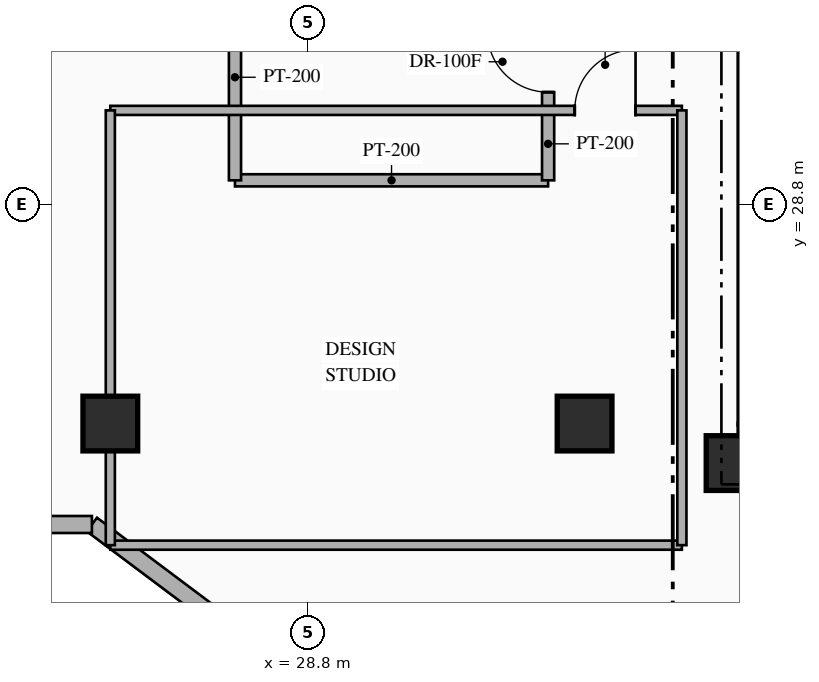
"""IFC4 building model, lengths in metres.
Left out: names, types, materials, properties, quantities, classifications, styles, units other than length and angle.
Written with IfcOpenShell. Run it as: python <this file> out.ifc"""

import sys

from ifc_helpers import new_model, si_unit, direction, frame, frame_2d, origin, origin_2d, place, context, subcontext, project, spatial, rectangle, hollow_rectangle, extrude, element, fill, save


model = new_model("IFC4")
c1 = context("Model", 3, precision=1e-05, world=origin(), true_north=direction((0.0, 1.0)))
c2 = subcontext(c1, "Body", "Model", "MODEL_VIEW")
j1 = project(units=[si_unit("LENGTHUNIT", "METRE"), si_unit("PLANEANGLEUNIT", "RADIAN")], contexts=[c1])
p1 = place(None, origin())
s1 = spatial("IfcSite", under=j1, at=p1, CompositionType="ELEMENT")
p2 = place(p1, origin())
s2 = spatial("IfcBuilding", under=s1, at=p2, CompositionType="ELEMENT")
p3 = place(p2, frame((0.0, 0.0, 126.45)))
s3 = spatial("IfcBuildingStorey", under=s2, at=p3, CompositionType="ELEMENT", Elevation=126.45)
p4 = place(p3, frame((35.89, 24.89, 0.0), z_axis=(0.0, 0.0, 1.0), x_axis=(1.0, 0.0, 0.0)))
e1 = element("IfcWall", 1, at=p4, inside=s3, PredefinedType="SHEAR", context=c2, shape_type="SweptSolid", body=[
    extrude(rectangle(XDim=7.76, YDim=0.6, at=frame_2d((3.88, 0.0))), origin(), (0.0, 0.0, 1.0), 3.6),
])
p5 = place(p3, frame((36.19, 25.19, 0.0), z_axis=(0.0, 0.0, 1.0), x_axis=(0.0, 1.0, 0.0)))
e2 = element("IfcWall", 2, at=p5, inside=s3, PredefinedType="SHEAR", context=c2, shape_type="SweptSolid", body=[
    extrude(rectangle(XDim=9.48, YDim=0.6, at=frame_2d((4.74, 0.0))), origin(), (0.0, 0.0, 1.0), 3.6),
])
p6 = place(p3, frame((35.8, 24.55, 0.0), z_axis=(0.0, 0.0, 1.0), x_axis=(1.0, 0.0, 0.0)))
e3 = element("IfcColumn", 3, at=p6, inside=s3, PredefinedType="COLUMN", context=c2, shape_type="SweptSolid", body=[
    extrude(rectangle(XDim=0.9, YDim=0.9, at=origin_2d()), origin(), (0.0, 0.0, 1.0), 3.6),
])
for number, where, z_axis, x_axis in (
    (4, (25.55, 25.2, 0.0), (0.0, 0.0, 1.0), (1.0, 0.0, 0.0)),
    (5, (33.35, 25.2, 0.0), (0.0, 0.0, 1.0), (1.0, 0.0, 0.0)),
):
    element("IfcColumn", number, at=place(p3, frame(where, z_axis=z_axis, x_axis=x_axis)), inside=s3, PredefinedType="COLUMN", context=c2, shape_type="SweptSolid", body=[
        extrude(hollow_rectangle(XDim=0.9, YDim=0.9, WallThickness=0.036, at=origin_2d()), origin(), (0.0, 0.0, 1.0), 3.6),
    ])
p7 = place(p3, frame((53.318, 2.487, 0.0), z_axis=(0.0, 0.0, 1.0), x_axis=(-0.800004174678, 0.599994433723, 0.0)))
e6 = element("IfcWall", 6, at=p7, inside=s3, PredefinedType="STANDARD", context=c2, shape_type="SweptSolid", body=[
    extrude(rectangle(XDim=35.089, YDim=0.28, at=frame_2d((17.544, 0.0))), origin(), (0.0, 0.0, 1.0), 3.34),
])
p8 = place(p3, frame((25.247, 23.54, 0.0), z_axis=(0.0, 0.0, 1.0), x_axis=(-1.0, 0.0, 0.0)))
e7 = element("IfcWall", 7, at=p8, inside=s3, PredefinedType="STANDARD", context=c2, shape_type="SweptSolid", body=[
    extrude(rectangle(XDim=6.747, YDim=0.28, at=frame_2d((3.374, 0.0))), origin(), (0.0, 0.0, 1.0), 3.34),
])
p9 = place(p3, frame((27.6, 29.2, 0.0), z_axis=(0.0, 0.0, 1.0), x_axis=(1.0, 0.0, 0.0)))
e8 = element("IfcWall", 8, at=p9, inside=s3, PredefinedType="STANDARD", context=c2, shape_type="SweptSolid", body=[
    extrude(rectangle(XDim=5.15, YDim=0.2, at=frame_2d((2.575, 0.0))), origin(), (0.0, 0.0, 1.0), 3.34),
])
p10 = place(p3, frame((27.6, 29.2, 0.0), z_axis=(0.0, 0.0, 1.0), x_axis=(0.0, 1.0, 0.0)))
e9 = element("IfcWall", 9, at=p10, inside=s3, PredefinedType="STANDARD", context=c2, shape_type="SweptSolid", body=[
    extrude(rectangle(XDim=3.39, YDim=0.2, at=frame_2d((1.695, 0.0))), origin(), (0.0, 0.0, 1.0), 3.34),
])
p11 = place(p3, frame((32.75, 29.2, 0.0), z_axis=(0.0, 0.0, 1.0), x_axis=(0.0, 1.0, 0.0)))
e10 = element("IfcWall", 10, at=p11, inside=s3, PredefinedType="STANDARD", context=c2, shape_type="SweptSolid", body=[
    extrude(rectangle(XDim=3.39, YDim=0.2, at=frame_2d((1.695, 0.0))), origin(), (0.0, 0.0, 1.0), 3.34),
])
p12 = place(p11, frame((1.45, 0.0, 0.0)))
e11 = element("IfcOpeningElement", 11, at=p12, cuts=e10, PredefinedType="OPENING", context=c2, shape_type="SweptSolid", body=[
    extrude(rectangle(XDim=1.0, YDim=2.2, at=frame_2d((0.5, 1.1))), frame((0.0, 0.11, 0.0), z_axis=(0.0, -1.0, 0.0), x_axis=(1.0, 0.0, 0.0)), (0.0, 0.0, 1.0), 0.22),
])
p13 = place(p3, frame((25.55, 23.2, 0.0), z_axis=(0.0, 0.0, 1.0), x_axis=(1.0, 0.0, 0.0)))
e12 = element("IfcWall", 12, at=p13, inside=s3, PredefinedType="PARTITIONING", context=c2, shape_type="SweptSolid", body=[
    extrude(rectangle(XDim=9.4, YDim=0.15, at=frame_2d((4.7, 0.0))), origin(), (0.0, 0.0, 1.0), 3.34),
])
p14 = place(p3, frame((25.55, 30.35, 0.0), z_axis=(0.0, 0.0, 1.0), x_axis=(1.0, 0.0, 0.0)))
e13 = element("IfcWall", 13, at=p14, inside=s3, PredefinedType="PARTITIONING", context=c2, shape_type="SweptSolid", body=[
    extrude(rectangle(XDim=9.4, YDim=0.15, at=frame_2d((4.7, 0.0))), origin(), (0.0, 0.0, 1.0), 3.34),
])
p15 = place(p14, frame((7.638, 0.0, 0.0)))
e14 = element("IfcOpeningElement", 14, at=p15, cuts=e13, PredefinedType="OPENING", context=c2, shape_type="SweptSolid", body=[
    extrude(rectangle(XDim=1.0, YDim=2.15, at=frame_2d((0.5, 1.075))), frame((0.0, 0.085, 0.0), z_axis=(0.0, -1.0, 0.0), x_axis=(1.0, 0.0, 0.0)), (0.0, 0.0, 1.0), 0.17),
])
p16 = place(p3, frame((25.55, 23.2, 0.0), z_axis=(0.0, 0.0, 1.0), x_axis=(0.0, 1.0, 0.0)))
e15 = element("IfcWall", 15, at=p16, inside=s3, PredefinedType="PARTITIONING", context=c2, shape_type="SweptSolid", body=[
    extrude(rectangle(XDim=7.15, YDim=0.15, at=frame_2d((3.575, 0.0))), origin(), (0.0, 0.0, 1.0), 2.695),
])
p17 = place(p3, frame((34.95, 23.2, 0.0), z_axis=(0.0, 0.0, 1.0), x_axis=(0.0, 1.0, 0.0)))
e16 = element("IfcWall", 16, at=p17, inside=s3, PredefinedType="PARTITIONING", context=c2, shape_type="SweptSolid", body=[
    extrude(rectangle(XDim=7.15, YDim=0.15, at=frame_2d((3.575, 0.0))), origin(), (0.0, 0.0, 1.0), 3.34),
])
p18 = place(p12, origin())
e17 = element("IfcDoor", 17, at=p18, inside=s3, OperationType="SINGLE_SWING_RIGHT", PredefinedType="DOOR", context=c2, shape_type="SweptSolid", body=[
    extrude(rectangle(XDim=1.0, YDim=2.2, at=frame_2d((0.5, 1.1))), frame((0.0, 0.025, 0.0), z_axis=(0.0, -1.0, 0.0), x_axis=(1.0, 0.0, 0.0)), (0.0, 0.0, 1.0), 0.05),
])
fill(e11, e17)
p19 = place(p15, origin())
e18 = element("IfcDoor", 18, at=p19, inside=s3, OperationType="SINGLE_SWING_RIGHT", PredefinedType="DOOR", context=c2, shape_type="SweptSolid", body=[
    extrude(rectangle(XDim=1.0, YDim=2.15, at=frame_2d((0.5, 1.075))), frame((0.0, 0.025, 0.0), z_axis=(0.0, -1.0, 0.0), x_axis=(1.0, 0.0, 0.0)), (0.0, 0.0, 1.0), 0.05),
])
fill(e14, e18)
save(model, sys.argv[1])
